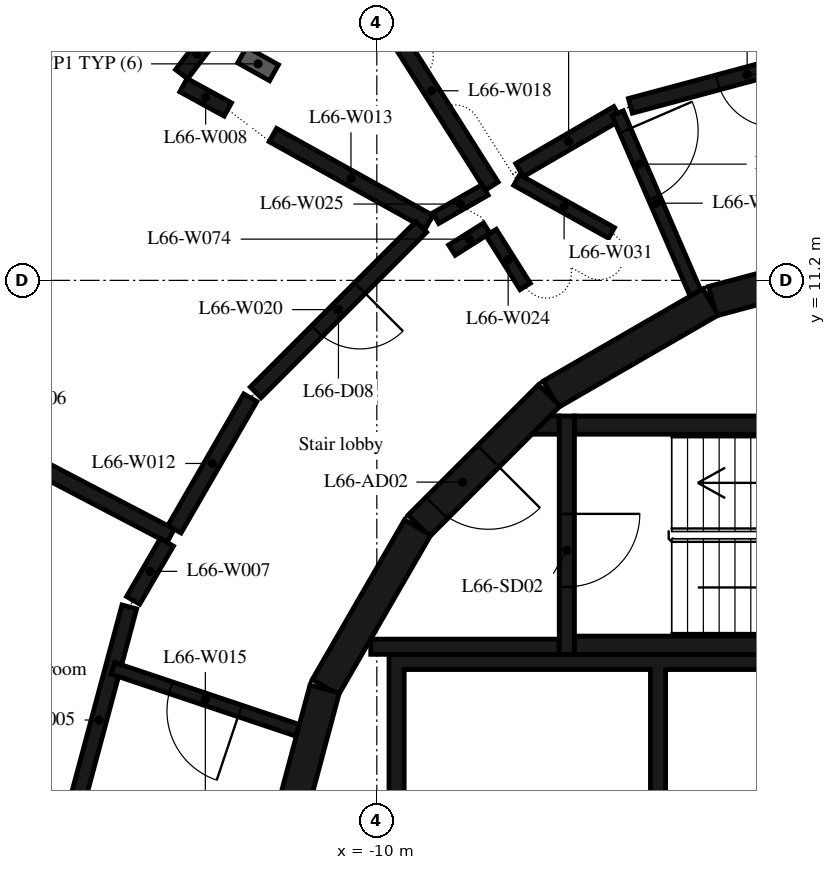
"""IFC4 building model, lengths in metres.
Left out: names, types, materials, properties, quantities, classifications, styles, units other than length and angle.
Written with IfcOpenShell. Run it as: python <this file> out.ifc"""

import sys

from ifc_helpers import new_model, si_unit, direction, frame, frame_2d, origin, place, context, subcontext, project, spatial, polyline, rectangle, outline, extrude, element, fill, save


model = new_model("IFC4")
c1 = context("Model", 3, precision=1e-05, world=origin(), true_north=direction((0.0, 1.0)))
c2 = subcontext(c1, "Body", "Model", "MODEL_VIEW")
j1 = project(units=[si_unit("LENGTHUNIT", "METRE"), si_unit("PLANEANGLEUNIT", "RADIAN")], contexts=[c1])
p1 = place(None, origin())
s1 = spatial("IfcSite", under=j1, at=p1, CompositionType="ELEMENT")
p2 = place(p1, origin())
s2 = spatial("IfcBuilding", under=s1, at=p2, CompositionType="ELEMENT")
p3 = place(p2, frame((0.0, 0.0, 258.2)))
s3 = spatial("IfcBuildingStorey", under=s2, at=p3, CompositionType="ELEMENT", Elevation=258.2)
for number, where, z_axis, x_axis in (
    (1, (-1.55, 11.643, 0.0), (0.0, 0.0, 1.0), (-0.966, -0.259, 0.0)),
    (2, (-4.51, 10.845, 0.0), (0.0, 0.0, 1.0), (-0.866, -0.5, 0.0)),
):
    element("IfcWall", number, at=place(p3, frame(where, z_axis=z_axis, x_axis=x_axis)), inside=s3, PredefinedType="SHEAR", context=c2, shape_type="SweptSolid", body=[
        extrude(rectangle(XDim=3.033, YDim=0.5, at=frame_2d((1.516, 0.0))), origin(), (0.0, 0.0, 1.0), 4.75),
    ])
p4 = place(p3, frame((-7.164, 9.308, 0.0), z_axis=(0.0, 0.0, 1.0), x_axis=(-0.707106781187, -0.707106781187, 0.0)))
e3 = element("IfcWall", 3, at=p4, inside=s3, PredefinedType="SHEAR", context=c2, shape_type="SweptSolid", body=[
    extrude(rectangle(XDim=3.032, YDim=0.5, at=frame_2d((1.516, 0.0))), origin(), (0.0, 0.0, 1.0), 4.75),
])
p5 = place(p4, frame((1.416, 0.0, 0.0)))
e4 = element("IfcOpeningElement", 4, at=p5, cuts=e3, PredefinedType="OPENING", context=c2, shape_type="SweptSolid", body=[
    extrude(rectangle(XDim=1.2, YDim=2.1, at=frame_2d((0.6, 1.05))), frame((0.0, 0.26, 0.0), z_axis=(0.0, -1.0, 0.0), x_axis=(1.0, 0.0, 0.0)), (0.0, 0.0, 1.0), 0.52),
])
for number, where, z_axis, x_axis in (
    (5, (-9.329, 7.137, 0.0), (0.0, 0.0, 1.0), (-0.5, -0.866, 0.0)),
    (6, (-10.858, 4.479, 0.0), (0.0, 0.0, 1.0), (-0.259, -0.966, 0.0)),
):
    element("IfcWall", number, at=place(p3, frame(where, z_axis=z_axis, x_axis=x_axis)), inside=s3, PredefinedType="SHEAR", context=c2, shape_type="SweptSolid", body=[
        extrude(rectangle(XDim=3.033, YDim=0.5, at=frame_2d((1.516, 0.0))), origin(), (0.0, 0.0, 1.0), 4.75),
    ])
for number, where, z_axis, x_axis in (
    (7, (-6.75, 5.2, 0.0), (0.0, 0.0, 1.0), (1.0, 0.0, 0.0)),
    (8, (-6.75, 8.82, 0.0), (0.0, 0.0, 1.0), (1.0, 0.0, 0.0)),
):
    element("IfcWall", number, at=place(p3, frame(where, z_axis=z_axis, x_axis=x_axis)), inside=s3, PredefinedType="SHEAR", context=c2, shape_type="SweptSolid", body=[
        extrude(rectangle(XDim=6.75, YDim=0.3, at=frame_2d((3.375, 0.0))), origin(), (0.0, 0.0, 1.0), 4.75),
    ])
p6 = place(p3, frame((-6.875, 8.97, 0.0), z_axis=(0.0, 0.0, 1.0), x_axis=(0.0, -1.0, 0.0)))
e9 = element("IfcWall", 9, at=p6, inside=s3, PredefinedType="SHEAR", context=c2, shape_type="SweptSolid", body=[
    extrude(rectangle(XDim=3.92, YDim=0.25, at=frame_2d((1.96, 0.0))), origin(), (0.0, 0.0, 1.0), 4.75),
])
p7 = place(p6, frame((1.61, 0.0, 0.0)))
e10 = element("IfcOpeningElement", 10, at=p7, cuts=e9, PredefinedType="OPENING", context=c2, shape_type="SweptSolid", body=[
    extrude(rectangle(XDim=1.2, YDim=2.1, at=frame_2d((0.6, 1.05))), frame((0.0, 0.135, 0.0), z_axis=(0.0, -1.0, 0.0), x_axis=(1.0, 0.0, 0.0)), (0.0, 0.0, 1.0), 0.27),
])
p8 = place(p3, frame((-7.0, 5.175, 0.0), z_axis=(0.0, 0.0, 1.0), x_axis=(-1.0, 0.0, 0.0)))
e11 = element("IfcWall", 11, at=p8, inside=s3, PredefinedType="SHEAR", context=c2, shape_type="SweptSolid", body=[
    extrude(rectangle(XDim=3.1, YDim=0.25, at=frame_2d((1.55, 0.0))), origin(), (0.0, 0.0, 1.0), 4.75),
])
p9 = place(p3, origin())
e12 = element("IfcWall", 12, at=p9, inside=s3, PredefinedType="SHEAR", context=c2, shape_type="SweptSolid", body=[
    extrude(outline(polyline([(-7.148, 8.97), (-7.0, 8.97), (-7.0, 8.67), (-7.448, 8.67), (-7.148, 8.97)])), origin(), (0.0, 0.0, 1.0), 4.75),
])
p10 = place(p3, origin())
e13 = element("IfcWall", 13, at=p10, inside=s3, PredefinedType="SHEAR", context=c2, shape_type="SweptSolid", body=[
    extrude(outline(polyline([(-9.55, 4.8), (-5.5, 4.8), (-5.5, 1.9), (-5.25, 1.9), (-5.25, 4.8), (-1.2, 4.8), (-1.2, 1.9), (-0.95, 1.9), (-0.95, 4.8), (0.95, 4.8), (0.95, 1.9), (1.2, 1.9), (1.2, 4.8), (3.1, 4.8), (3.1, 1.9), (3.35, 1.9), (3.35, 4.8), (5.25, 4.8), (5.25, 1.9), (5.5, 1.9), (5.5, 4.8), (7.4, 4.8), (7.4, 1.9), (7.65, 1.9), (7.65, 4.8), (9.55, 4.8), (9.55, 1.9), (9.8, 1.9), (9.8, 4.8), (9.8, 5.05), (-9.8, 5.05), (-9.8, 4.8), (-9.8, 1.9), (-9.55, 1.9), (-9.55, 4.8)])), origin(), (0.0, 0.0, 1.0), 4.75),
])
p11 = place(p3, frame((-14.07, 5.83, 0.0), z_axis=(0.0, 0.0, 1.0), x_axis=(-0.259059323171, -0.965861411942, 0.0)))
e14 = element("IfcWall", 14, at=p11, inside=s3, PredefinedType="PARTITIONING", context=c2, shape_type="SweptSolid", body=[
    extrude(rectangle(XDim=3.851, YDim=0.25, at=frame_2d((1.925, 0.0))), origin(), (0.0, 0.0, 1.0), 4.75),
])
p12 = place(p3, frame((-13.39, 7.0, 0.0), z_axis=(0.0, 0.0, 1.0), x_axis=(-0.886293445751, 0.463124095701, 0.0)))
e15 = element("IfcWall", 15, at=p12, inside=s3, PredefinedType="PARTITIONING", context=c2, shape_type="SweptSolid", body=[
    extrude(rectangle(XDim=5.426, YDim=0.25, at=frame_2d((2.713, 0.0))), origin(), (0.0, 0.0, 1.0), 4.75),
])
p13 = place(p3, frame((-13.453, 6.892, 0.0), z_axis=(0.0, 0.0, 1.0), x_axis=(-0.502370413152, -0.864652512857, 0.0)))
e16 = element("IfcWall", 16, at=p13, inside=s3, PredefinedType="PARTITIONING", context=c2, shape_type="SweptSolid", body=[
    extrude(rectangle(XDim=1.103, YDim=0.25, at=frame_2d((0.552, 0.0))), origin(), (0.0, 0.0, 1.0), 4.75),
])
p14 = place(p3, frame((-13.18, 14.41, 0.0), z_axis=(0.0, 0.0, 1.0), x_axis=(0.877019761318, -0.480454304026, 0.0)))
e17 = element("IfcWall", 17, at=p14, inside=s3, PredefinedType="PARTITIONING", context=c2, shape_type="SweptSolid", body=[
    extrude(rectangle(XDim=0.832, YDim=0.25, at=frame_2d((0.416, 0.0))), origin(), (0.0, 0.0, 1.0), 4.75),
])
p15 = place(p3, frame((-12.71, 15.25, 0.0), z_axis=(0.0, 0.0, 1.0), x_axis=(-0.603908782769, -0.797053437415, 0.0)))
e18 = element("IfcWall", 18, at=p15, inside=s3, PredefinedType="PARTITIONING", context=c2, shape_type="SweptSolid", body=[
    extrude(rectangle(XDim=0.828, YDim=0.25, at=frame_2d((0.414, 0.0))), origin(), (0.0, 0.0, 1.0), 4.75),
])
p16 = place(p3, frame((-12.08, 9.27, 0.0), z_axis=(0.0, 0.0, 1.0), x_axis=(-0.499821239653, -0.866128586522, 0.0)))
e19 = element("IfcWall", 19, at=p16, inside=s3, PredefinedType="PARTITIONING", context=c2, shape_type="SweptSolid", body=[
    extrude(rectangle(XDim=2.496, YDim=0.25, at=frame_2d((1.248, 0.0))), origin(), (0.0, 0.0, 1.0), 4.75),
])
p17 = place(p3, frame((-11.71, 13.59, 0.0), z_axis=(0.0, 0.0, 1.0), x_axis=(0.873816418471, -0.486255968406, 0.0)))
e20 = element("IfcWall", 20, at=p17, inside=s3, PredefinedType="PARTITIONING", context=c2, shape_type="SweptSolid", body=[
    extrude(rectangle(XDim=2.941, YDim=0.25, at=frame_2d((1.471, 0.0))), origin(), (0.0, 0.0, 1.0), 4.75),
])
p18 = place(p3, frame((-11.3, 3.8, 0.0), z_axis=(0.0, 0.0, 1.0), x_axis=(-0.94805712629, 0.318100118345, 0.0)))
e21 = element("IfcWall", 21, at=p18, inside=s3, PredefinedType="PARTITIONING", context=c2, shape_type="SweptSolid", body=[
    extrude(rectangle(XDim=3.207, YDim=0.2, at=frame_2d((1.603, 0.0))), origin(), (0.0, 0.0, 1.0), 4.75),
])
p19 = place(p18, frame((1.003, 0.0, 0.0)))
e22 = element("IfcOpeningElement", 22, at=p19, cuts=e21, PredefinedType="OPENING", context=c2, shape_type="SweptSolid", body=[
    extrude(rectangle(XDim=1.2, YDim=2.1, at=frame_2d((0.6, 1.05))), frame((0.0, 0.11, 0.0), z_axis=(0.0, -1.0, 0.0), x_axis=(1.0, 0.0, 0.0)), (0.0, 0.0, 1.0), 0.22),
])
p20 = place(p3, frame((-10.098, 15.886, 0.0), z_axis=(0.0, 0.0, 1.0), x_axis=(0.535343000647, -0.844634756364, 0.0)))
e23 = element("IfcWall", 23, at=p20, inside=s3, PredefinedType="PARTITIONING", context=c2, shape_type="SweptSolid", body=[
    extrude(rectangle(XDim=3.713, YDim=0.25, at=frame_2d((1.856, 0.0))), origin(), (0.0, 0.0, 1.0), 4.75),
])
p21 = place(p3, frame((-9.27, 12.08, 0.0), z_axis=(0.0, 0.0, 1.0), x_axis=(-0.707106781187, -0.707106781187, 0.0)))
e24 = element("IfcWall", 24, at=p21, inside=s3, PredefinedType="PARTITIONING", context=c2, shape_type="SweptSolid", body=[
    extrude(rectangle(XDim=3.849, YDim=0.25, at=frame_2d((1.925, 0.0))), origin(), (0.0, 0.0, 1.0), 4.75),
])
p22 = place(p21, frame((1.425, 0.0, 0.0)))
e25 = element("IfcOpeningElement", 25, at=p22, cuts=e24, PredefinedType="OPENING", context=c2, shape_type="SweptSolid", body=[
    extrude(rectangle(XDim=1.0, YDim=2.1, at=frame_2d((0.5, 1.05))), frame((0.0, 0.135, 0.0), z_axis=(0.0, -1.0, 0.0), x_axis=(1.0, 0.0, 0.0)), (0.0, 0.0, 1.0), 0.27),
])
p23 = place(p3, frame((-8.12, 11.986, 0.0), z_axis=(0.0, 0.0, 1.0), x_axis=(0.534054329683, -0.845450159943, 0.0)))
e26 = element("IfcWall", 26, at=p23, inside=s3, PredefinedType="PARTITIONING", context=c2, shape_type="SweptSolid", body=[
    extrude(rectangle(XDim=1.048, YDim=0.2, at=frame_2d((0.524, 0.0))), origin(), (0.0, 0.0, 1.0), 4.75),
])
p24 = place(p3, frame((-8.219, 12.688, 0.0), z_axis=(0.0, 0.0, 1.0), x_axis=(-0.867665313517, -0.497148774231, 0.0)))
e27 = element("IfcWall", 27, at=p24, inside=s3, PredefinedType="PARTITIONING", context=c2, shape_type="SweptSolid", body=[
    extrude(rectangle(XDim=0.937, YDim=0.2, at=frame_2d((0.469, 0.0))), origin(), (0.0, 0.0, 1.0), 4.75),
])
p25 = place(p3, frame((-7.652, 13.013, 0.0), z_axis=(0.0, 0.0, 1.0), x_axis=(0.864528358021, 0.50258404091, 0.0)))
e28 = element("IfcWall", 28, at=p25, inside=s3, PredefinedType="PARTITIONING", context=c2, shape_type="SweptSolid", body=[
    extrude(rectangle(XDim=1.865, YDim=0.25, at=frame_2d((0.932, 0.0))), origin(), (0.0, 0.0, 1.0), 4.75),
])
p26 = place(p3, frame((-6.14, 11.98, 0.0), z_axis=(0.0, 0.0, 1.0), x_axis=(-0.873343748456, 0.487104400547, 0.0)))
e29 = element("IfcWall", 29, at=p26, inside=s3, PredefinedType="PARTITIONING", context=c2, shape_type="SweptSolid", body=[
    extrude(rectangle(XDim=1.786, YDim=0.2, at=frame_2d((0.893, 0.0))), origin(), (0.0, 0.0, 1.0), 4.75),
])
p27 = place(p3, frame((-6.039, 13.948, 0.0), z_axis=(0.0, 0.0, 1.0), x_axis=(0.396897353622, -0.917863002135, 0.0)))
e30 = element("IfcWall", 30, at=p27, inside=s3, PredefinedType="PARTITIONING", context=c2, shape_type="SweptSolid", body=[
    extrude(rectangle(XDim=3.223, YDim=0.2, at=frame_2d((1.612, 0.0))), origin(), (0.0, 0.0, 1.0), 4.75),
])
p28 = place(p27, frame((0.312, 0.0, 0.0)))
e31 = element("IfcOpeningElement", 31, at=p28, cuts=e30, PredefinedType="OPENING", context=c2, shape_type="SweptSolid", body=[
    extrude(rectangle(XDim=1.2, YDim=2.1, at=frame_2d((0.6, 1.05))), frame((0.0, 0.11, 0.0), z_axis=(0.0, -1.0, 0.0), x_axis=(1.0, 0.0, 0.0)), (0.0, 0.0, 1.0), 0.22),
])
p29 = place(p3, frame((-1.99, 15.1, 0.0), z_axis=(0.0, 0.0, 1.0), x_axis=(-0.965857829358, -0.259072679895, 0.0)))
e32 = element("IfcWall", 32, at=p29, inside=s3, PredefinedType="PARTITIONING", context=c2, shape_type="SweptSolid", body=[
    extrude(rectangle(XDim=3.976, YDim=0.25, at=frame_2d((1.988, 0.0))), origin(), (0.0, 0.0, 1.0), 4.75),
])
p30 = place(p29, frame((1.488, 0.0, 0.0)))
e33 = element("IfcOpeningElement", 33, at=p30, cuts=e32, PredefinedType="OPENING", context=c2, shape_type="SweptSolid", body=[
    extrude(rectangle(XDim=1.0, YDim=2.1, at=frame_2d((0.5, 1.05))), frame((0.0, 0.135, 0.0), z_axis=(0.0, -1.0, 0.0), x_axis=(1.0, 0.0, 0.0)), (0.0, 0.0, 1.0), 0.27),
])
p31 = place(p3, frame((-8.192, 12.059, 0.0), z_axis=(0.0, 0.0, 1.0), x_axis=(-0.845540263532, -0.533911661932, 0.0)))
e34 = element("IfcWall", 34, at=p31, inside=s3, PredefinedType="PARTITIONING", context=c2, shape_type="SweptSolid", body=[
    extrude(rectangle(XDim=0.678, YDim=0.2, at=frame_2d((0.339, 0.0))), origin(), (0.0, 0.0, 1.0), 4.75),
])
p32 = place(p7, origin())
e35 = element("IfcDoor", 35, at=p32, inside=s3, OperationType="SINGLE_SWING_LEFT", PredefinedType="DOOR", context=c2, shape_type="SweptSolid", body=[
    extrude(rectangle(XDim=1.2, YDim=2.1, at=frame_2d((0.6, 1.05))), frame((0.0, 0.025, 0.0), z_axis=(0.0, -1.0, 0.0), x_axis=(1.0, 0.0, 0.0)), (0.0, 0.0, 1.0), 0.05),
])
fill(e10, e35)
p33 = place(p5, origin())
e36 = element("IfcDoor", 36, at=p33, inside=s3, OperationType="SINGLE_SWING_RIGHT", PredefinedType="DOOR", context=c2, shape_type="SweptSolid", body=[
    extrude(rectangle(XDim=1.2, YDim=2.1, at=frame_2d((0.6, 1.05))), frame((0.0, 0.025, 0.0), z_axis=(0.0, -1.0, 0.0), x_axis=(1.0, 0.0, 0.0)), (0.0, 0.0, 1.0), 0.05),
])
fill(e4, e36)
p34 = place(p22, origin())
e37 = element("IfcDoor", 37, at=p34, inside=s3, OperationType="SINGLE_SWING_LEFT", PredefinedType="DOOR", context=c2, shape_type="SweptSolid", body=[
    extrude(rectangle(XDim=1.0, YDim=2.1, at=frame_2d((0.5, 1.05))), frame((0.0, 0.025, 0.0), z_axis=(0.0, -1.0, 0.0), x_axis=(1.0, 0.0, 0.0)), (0.0, 0.0, 1.0), 0.05),
])
fill(e25, e37)
p35 = place(p30, origin())
e38 = element("IfcDoor", 38, at=p35, inside=s3, OperationType="SINGLE_SWING_LEFT", PredefinedType="DOOR", context=c2, shape_type="SweptSolid", body=[
    extrude(rectangle(XDim=1.0, YDim=2.1, at=frame_2d((0.5, 1.05))), frame((0.0, 0.025, 0.0), z_axis=(0.0, -1.0, 0.0), x_axis=(1.0, 0.0, 0.0)), (0.0, 0.0, 1.0), 0.05),
])
fill(e33, e38)
p36 = place(p28, origin())
e39 = element("IfcDoor", 39, at=p36, inside=s3, OperationType="SINGLE_SWING_LEFT", PredefinedType="DOOR", context=c2, shape_type="SweptSolid", body=[
    extrude(rectangle(XDim=1.2, YDim=2.1, at=frame_2d((0.6, 1.05))), frame((0.0, 0.025, 0.0), z_axis=(0.0, -1.0, 0.0), x_axis=(1.0, 0.0, 0.0)), (0.0, 0.0, 1.0), 0.05),
])
fill(e31, e39)
p37 = place(p19, origin())
e40 = element("IfcDoor", 40, at=p37, inside=s3, OperationType="SINGLE_SWING_LEFT", PredefinedType="DOOR", context=c2, shape_type="SweptSolid", body=[
    extrude(rectangle(XDim=1.2, YDim=2.1, at=frame_2d((0.6, 1.05))), frame((0.0, 0.025, 0.0), z_axis=(0.0, -1.0, 0.0), x_axis=(1.0, 0.0, 0.0)), (0.0, 0.0, 1.0), 0.05),
])
fill(e22, e40)
save(model, sys.argv[1])
